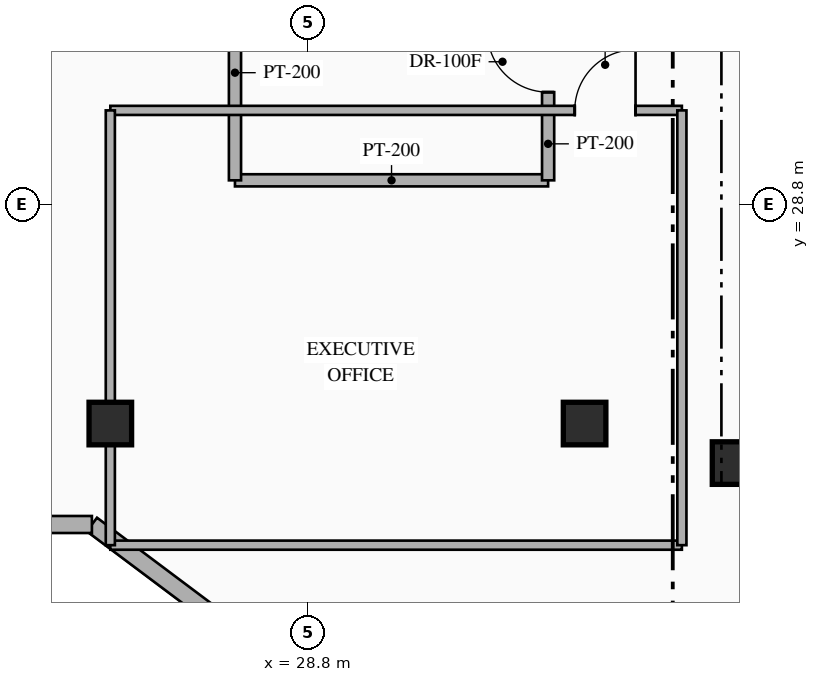
"""IFC4 building model, lengths in metres.
Left out: names, types, materials, properties, quantities, classifications, styles, units other than length and angle.
Written with IfcOpenShell. Run it as: python <this file> out.ifc"""

import sys

from ifc_helpers import new_model, si_unit, direction, frame, frame_2d, origin, origin_2d, place, context, subcontext, project, spatial, rectangle, hollow_rectangle, extrude, element, fill, save


model = new_model("IFC4")
c1 = context("Model", 3, precision=1e-05, world=origin(), true_north=direction((0.0, 1.0)))
c2 = subcontext(c1, "Body", "Model", "MODEL_VIEW")
j1 = project(units=[si_unit("LENGTHUNIT", "METRE"), si_unit("PLANEANGLEUNIT", "RADIAN")], contexts=[c1])
p1 = place(None, origin())
s1 = spatial("IfcSite", under=j1, at=p1, CompositionType="ELEMENT")
p2 = place(p1, origin())
s2 = spatial("IfcBuilding", under=s1, at=p2, CompositionType="ELEMENT")
p3 = place(p2, frame((0.0, 0.0, 231.15)))
s3 = spatial("IfcBuildingStorey", under=s2, at=p3, CompositionType="ELEMENT", Elevation=231.15)
for number, where, z_axis, x_axis in (
    (1, (35.8, 24.55, 0.0), (0.0, 0.0, 1.0), (1.0, 0.0, 0.0)),
    (2, (25.55, 25.2, 0.0), (0.0, 0.0, 1.0), (1.0, 0.0, 0.0)),
    (3, (33.35, 25.2, 0.0), (0.0, 0.0, 1.0), (1.0, 0.0, 0.0)),
):
    element("IfcColumn", number, at=place(p3, frame(where, z_axis=z_axis, x_axis=x_axis)), inside=s3, PredefinedType="COLUMN", context=c2, shape_type="SweptSolid", body=[
        extrude(hollow_rectangle(XDim=0.7, YDim=0.7, WallThickness=0.028, at=origin_2d()), origin(), (0.0, 0.0, 1.0), 3.6),
    ])
p4 = place(p3, frame((44.918, 8.787, 0.0), z_axis=(0.0, 0.0, 1.0), x_axis=(-0.800004765927, 0.599993645378, 0.0)))
e4 = element("IfcWall", 4, at=p4, inside=s3, PredefinedType="STANDARD", context=c2, shape_type="SweptSolid", body=[
    extrude(rectangle(XDim=24.588, YDim=0.28, at=frame_2d((12.294, 0.0))), origin(), (0.0, 0.0, 1.0), 3.3),
])
p5 = place(p3, frame((25.247, 23.54, 0.0), z_axis=(0.0, 0.0, 1.0), x_axis=(-1.0, 0.0, 0.0)))
e5 = element("IfcWall", 5, at=p5, inside=s3, PredefinedType="STANDARD", context=c2, shape_type="SweptSolid", body=[
    extrude(rectangle(XDim=4.789, YDim=0.28, at=frame_2d((2.395, 0.0))), origin(), (0.0, 0.0, 1.0), 3.3),
])
p6 = place(p3, frame((27.6, 29.2, 0.0), z_axis=(0.0, 0.0, 1.0), x_axis=(1.0, 0.0, 0.0)))
e6 = element("IfcWall", 6, at=p6, inside=s3, PredefinedType="STANDARD", context=c2, shape_type="SweptSolid", body=[
    extrude(rectangle(XDim=5.15, YDim=0.2, at=frame_2d((2.575, 0.0))), origin(), (0.0, 0.0, 1.0), 3.3),
])
p7 = place(p3, frame((27.6, 29.2, 0.0), z_axis=(0.0, 0.0, 1.0), x_axis=(0.0, 1.0, 0.0)))
e7 = element("IfcWall", 7, at=p7, inside=s3, PredefinedType="STANDARD", context=c2, shape_type="SweptSolid", body=[
    extrude(rectangle(XDim=3.54, YDim=0.2, at=frame_2d((1.77, 0.0))), origin(), (0.0, 0.0, 1.0), 3.3),
])
p8 = place(p3, frame((32.75, 29.2, 0.0), z_axis=(0.0, 0.0, 1.0), x_axis=(0.0, 1.0, 0.0)))
e8 = element("IfcWall", 8, at=p8, inside=s3, PredefinedType="STANDARD", context=c2, shape_type="SweptSolid", body=[
    extrude(rectangle(XDim=3.54, YDim=0.2, at=frame_2d((1.77, 0.0))), origin(), (0.0, 0.0, 1.0), 3.3),
])
p9 = place(p8, frame((1.45, 0.0, 0.0)))
e9 = element("IfcOpeningElement", 9, at=p9, cuts=e8, PredefinedType="OPENING", context=c2, shape_type="SweptSolid", body=[
    extrude(rectangle(XDim=1.0, YDim=2.2, at=frame_2d((0.5, 1.1))), frame((0.0, 0.11, 0.0), z_axis=(0.0, -1.0, 0.0), x_axis=(1.0, 0.0, 0.0)), (0.0, 0.0, 1.0), 0.22),
])
p10 = place(p3, frame((25.55, 23.2, 0.0), z_axis=(0.0, 0.0, 1.0), x_axis=(1.0, 0.0, 0.0)))
e10 = element("IfcWall", 10, at=p10, inside=s3, PredefinedType="PARTITIONING", context=c2, shape_type="SweptSolid", body=[
    extrude(rectangle(XDim=9.4, YDim=0.15, at=frame_2d((4.7, 0.0))), origin(), (0.0, 0.0, 1.0), 3.3),
])
p11 = place(p3, frame((25.55, 30.35, 0.0), z_axis=(0.0, 0.0, 1.0), x_axis=(1.0, 0.0, 0.0)))
e11 = element("IfcWall", 11, at=p11, inside=s3, PredefinedType="PARTITIONING", context=c2, shape_type="SweptSolid", body=[
    extrude(rectangle(XDim=9.4, YDim=0.15, at=frame_2d((4.7, 0.0))), origin(), (0.0, 0.0, 1.0), 3.3),
])
p12 = place(p11, frame((7.638, 0.0, 0.0)))
e12 = element("IfcOpeningElement", 12, at=p12, cuts=e11, PredefinedType="OPENING", context=c2, shape_type="SweptSolid", body=[
    extrude(rectangle(XDim=1.0, YDim=2.15, at=frame_2d((0.5, 1.075))), frame((0.0, 0.085, 0.0), z_axis=(0.0, -1.0, 0.0), x_axis=(1.0, 0.0, 0.0)), (0.0, 0.0, 1.0), 0.17),
])
p13 = place(p3, frame((25.55, 23.2, 0.0), z_axis=(0.0, 0.0, 1.0), x_axis=(0.0, 1.0, 0.0)))
e13 = element("IfcWall", 13, at=p13, inside=s3, PredefinedType="PARTITIONING", context=c2, shape_type="SweptSolid", body=[
    extrude(rectangle(XDim=7.15, YDim=0.15, at=frame_2d((3.575, 0.0))), origin(), (0.0, 0.0, 1.0), 2.707),
])
p14 = place(p3, frame((34.95, 23.2, 0.0), z_axis=(0.0, 0.0, 1.0), x_axis=(0.0, 1.0, 0.0)))
e14 = element("IfcWall", 14, at=p14, inside=s3, PredefinedType="PARTITIONING", context=c2, shape_type="SweptSolid", body=[
    extrude(rectangle(XDim=7.15, YDim=0.15, at=frame_2d((3.575, 0.0))), origin(), (0.0, 0.0, 1.0), 3.3),
])
p15 = place(p9, origin())
e15 = element("IfcDoor", 15, at=p15, inside=s3, OperationType="SINGLE_SWING_RIGHT", PredefinedType="DOOR", context=c2, shape_type="SweptSolid", body=[
    extrude(rectangle(XDim=1.0, YDim=2.2, at=frame_2d((0.5, 1.1))), frame((0.0, 0.025, 0.0), z_axis=(0.0, -1.0, 0.0), x_axis=(1.0, 0.0, 0.0)), (0.0, 0.0, 1.0), 0.05),
])
fill(e9, e15)
p16 = place(p12, origin())
e16 = element("IfcDoor", 16, at=p16, inside=s3, OperationType="SINGLE_SWING_RIGHT", PredefinedType="DOOR", context=c2, shape_type="SweptSolid", body=[
    extrude(rectangle(XDim=1.0, YDim=2.15, at=frame_2d((0.5, 1.075))), frame((0.0, 0.025, 0.0), z_axis=(0.0, -1.0, 0.0), x_axis=(1.0, 0.0, 0.0)), (0.0, 0.0, 1.0), 0.05),
])
fill(e12, e16)
save(model, sys.argv[1])
